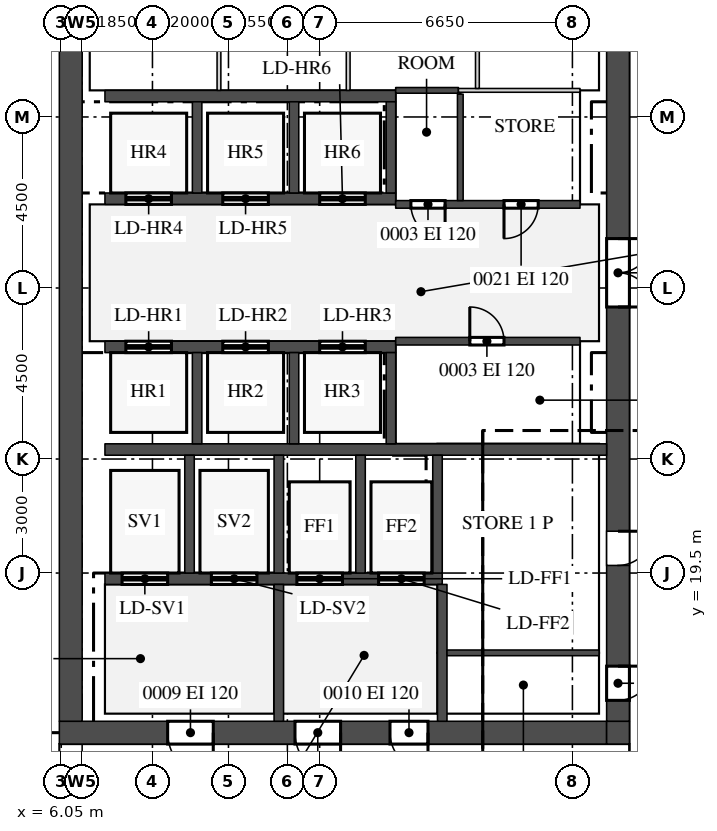
"""IFC4 building model, lengths in metres.
Left out: names, types, materials, properties, quantities, classifications, styles, units other than length and angle.
Written with IfcOpenShell. Run it as: python <this file> out.ifc"""

import sys

from ifc_helpers import new_model, si_unit, direction, frame, frame_2d, origin, place, context, subcontext, project, spatial, rectangle, extrude, source, transform, mapped, element, fill, save


model = new_model("IFC4")
c1 = context("Model", 3, precision=1e-05, world=origin(), true_north=direction((0.0, 1.0)))
c2 = subcontext(c1, "Body", "Model", "MODEL_VIEW")
j1 = project(units=[si_unit("LENGTHUNIT", "METRE"), si_unit("PLANEANGLEUNIT", "RADIAN")], contexts=[c1])
p1 = place(None, origin())
s1 = spatial("IfcSite", under=j1, at=p1, CompositionType="ELEMENT")
p2 = place(p1, origin())
s2 = spatial("IfcBuilding", under=s1, at=p2, CompositionType="ELEMENT")
p3 = place(p2, frame((0.0, 0.0, 318.2)))
s3 = spatial("IfcBuildingStorey", under=s2, at=p3, CompositionType="ELEMENT", Elevation=318.2)
m1 = source(origin(), c2, "Body", "SweptSolid", [
    extrude(rectangle(XDim=14.4, YDim=0.6, at=frame_2d((7.2, 0.0))), origin(), (0.0, 0.0, 1.0), 3.75),
])
p4 = place(p3, frame((6.0, 15.3, 0.0), z_axis=(0.0, 0.0, 1.0), x_axis=(1.0, 0.0, 0.0)))
e1 = element("IfcWall", 1, at=p4, inside=s3, PredefinedType="SHEAR", context=c2, shape_type="MappedRepresentation", body=[
    mapped(m1, transform((0.0, 0.0, 0.0))),
])
m2 = source(origin(), c2, "Body", "SweptSolid", [
    extrude(rectangle(XDim=1.2, YDim=2.1, at=frame_2d((0.6, 1.05))), frame((0.0, 0.31, 0.0), z_axis=(0.0, -1.0, 0.0), x_axis=(1.0, 0.0, 0.0)), (0.0, 0.0, 1.0), 0.62),
])
p5 = place(p4, frame((6.2, 0.0, 0.0)))
e2 = element("IfcOpeningElement", 2, at=p5, cuts=e1, PredefinedType="OPENING", context=c2, shape_type="MappedRepresentation", body=[
    mapped(m2, transform((0.0, 0.0, 0.0))),
])
p6 = place(p4, frame((2.85, 0.0, 0.0)))
e3 = element("IfcOpeningElement", 3, at=p6, cuts=e1, PredefinedType="OPENING", context=c2, shape_type="MappedRepresentation", body=[
    mapped(m2, transform((0.0, 0.0, 0.0))),
])
m3 = source(origin(), c2, "Body", "SweptSolid", [
    extrude(rectangle(XDim=1.0, YDim=2.1, at=frame_2d((0.5, 1.05))), frame((0.0, 0.31, 0.0), z_axis=(0.0, -1.0, 0.0), x_axis=(1.0, 0.0, 0.0)), (0.0, 0.0, 1.0), 0.62),
])
p7 = place(p4, frame((8.7, 0.0, 0.0)))
e4 = element("IfcOpeningElement", 4, at=p7, cuts=e1, PredefinedType="OPENING", context=c2, shape_type="MappedRepresentation", body=[
    mapped(m3, transform((0.0, 0.0, 0.0))),
])
m4 = source(origin(), c2, "Body", "SweptSolid", [
    extrude(rectangle(XDim=0.6, YDim=0.6, at=frame_2d((0.3, 0.0))), origin(), (0.0, 0.0, 1.0), 3.75),
])
p8 = place(p3, frame((20.4, 15.3, 0.0), z_axis=(0.0, 0.0, 1.0), x_axis=(1.0, 0.0, 0.0)))
e5 = element("IfcWall", 5, at=p8, inside=s3, PredefinedType="SHEAR", context=c2, shape_type="MappedRepresentation", body=[
    mapped(m4, transform((0.0, 0.0, 0.0))),
])
m5 = source(origin(), c2, "Body", "SweptSolid", [
    extrude(rectangle(XDim=22.8, YDim=0.6, at=frame_2d((11.4, 0.0))), origin(), (0.0, 0.0, 1.0), 3.75),
])
p9 = place(p3, frame((20.7, 15.6, 0.0), z_axis=(0.0, 0.0, 1.0), x_axis=(0.0, 1.0, 0.0)))
e6 = element("IfcWall", 6, at=p9, inside=s3, PredefinedType="SHEAR", context=c2, shape_type="MappedRepresentation", body=[
    mapped(m5, transform((0.0, 0.0, 0.0))),
])
m6 = source(origin(), c2, "Body", "SweptSolid", [
    extrude(rectangle(XDim=1.8, YDim=2.1, at=frame_2d((0.9, 1.05))), frame((0.0, 0.31, 0.0), z_axis=(0.0, -1.0, 0.0), x_axis=(1.0, 0.0, 0.0)), (0.0, 0.0, 1.0), 0.62),
])
p10 = place(p9, frame((10.9, 0.0, 0.0)))
e7 = element("IfcOpeningElement", 7, at=p10, cuts=e6, PredefinedType="OPENING", context=c2, shape_type="MappedRepresentation", body=[
    mapped(m6, transform((0.0, 0.0, 0.0))),
])
m7 = source(origin(), c2, "Body", "SweptSolid", [
    extrude(rectangle(XDim=0.9, YDim=2.1, at=frame_2d((0.45, 1.05))), frame((0.0, 0.31, 0.0), z_axis=(0.0, -1.0, 0.0), x_axis=(1.0, 0.0, 0.0)), (0.0, 0.0, 1.0), 0.62),
])
p11 = place(p9, frame((0.55, 0.0, 0.0)))
e8 = element("IfcOpeningElement", 8, at=p11, cuts=e6, PredefinedType="OPENING", context=c2, shape_type="MappedRepresentation", body=[
    mapped(m7, transform((0.0, 0.0, 0.0))),
])
p12 = place(p9, frame((4.1, 0.0, 0.0)))
e9 = element("IfcOpeningElement", 9, at=p12, cuts=e6, PredefinedType="OPENING", context=c2, shape_type="MappedRepresentation", body=[
    mapped(m7, transform((0.0, 0.0, 0.0))),
])
p13 = place(p3, frame((6.3, 15.6, 0.0), z_axis=(0.0, 0.0, 1.0), x_axis=(0.0, 1.0, 0.0)))
e10 = element("IfcWall", 10, at=p13, inside=s3, PredefinedType="SHEAR", context=c2, shape_type="MappedRepresentation", body=[
    mapped(m5, transform((0.0, 0.0, 0.0))),
])
m8 = source(origin(), c2, "Body", "SweptSolid", [
    extrude(rectangle(XDim=13.2, YDim=0.3, at=frame_2d((6.6, 0.0))), origin(), (0.0, 0.0, 1.0), 3.75),
])
p14 = place(p3, frame((7.2, 22.75, 0.0), z_axis=(0.0, 0.0, 1.0), x_axis=(1.0, 0.0, 0.0)))
e11 = element("IfcWall", 11, at=p14, inside=s3, PredefinedType="STANDARD", context=c2, shape_type="MappedRepresentation", body=[
    mapped(m8, transform((0.0, 0.0, 0.0))),
])
m9 = source(origin(), c2, "Body", "SweptSolid", [
    extrude(rectangle(XDim=8.875, YDim=0.3, at=frame_2d((4.438, 0.0))), origin(), (0.0, 0.0, 1.0), 3.75),
])
p15 = place(p3, frame((7.2, 19.35, 0.0), z_axis=(0.0, 0.0, 1.0), x_axis=(1.0, 0.0, 0.0)))
e12 = element("IfcWall", 12, at=p15, inside=s3, PredefinedType="STANDARD", context=c2, shape_type="MappedRepresentation", body=[
    mapped(m9, transform((0.0, 0.0, 0.0))),
])
m10 = source(origin(), c2, "Body", "SweptSolid", [
    extrude(rectangle(XDim=1.2, YDim=2.1, at=frame_2d((0.6, 1.05))), frame((0.0, 0.16, 0.0), z_axis=(0.0, -1.0, 0.0), x_axis=(1.0, 0.0, 0.0)), (0.0, 0.0, 1.0), 0.32),
])
p16 = place(p15, frame((0.45, 0.0, 0.0)))
e13 = element("IfcOpeningElement", 13, at=p16, cuts=e12, PredefinedType="OPENING", context=c2, shape_type="MappedRepresentation", body=[
    mapped(m10, transform((0.0, 0.0, 0.0))),
])
p17 = place(p15, frame((2.8, 0.0, 0.0)))
e14 = element("IfcOpeningElement", 14, at=p17, cuts=e12, PredefinedType="OPENING", context=c2, shape_type="MappedRepresentation", body=[
    mapped(m10, transform((0.0, 0.0, 0.0))),
])
p18 = place(p15, frame((5.05, 0.0, 0.0)))
e15 = element("IfcOpeningElement", 15, at=p18, cuts=e12, PredefinedType="OPENING", context=c2, shape_type="MappedRepresentation", body=[
    mapped(m10, transform((0.0, 0.0, 0.0))),
])
p19 = place(p15, frame((7.2, 0.0, 0.0)))
e16 = element("IfcOpeningElement", 16, at=p19, cuts=e12, PredefinedType="OPENING", context=c2, shape_type="MappedRepresentation", body=[
    mapped(m10, transform((0.0, 0.0, 0.0))),
])
m11 = source(origin(), c2, "Body", "SweptSolid", [
    extrude(rectangle(XDim=7.65, YDim=0.3, at=frame_2d((3.825, 0.0))), origin(), (0.0, 0.0, 1.0), 3.75),
])
p20 = place(p3, frame((7.2, 32.05, 0.0), z_axis=(0.0, 0.0, 1.0), x_axis=(1.0, 0.0, 0.0)))
e17 = element("IfcWall", 17, at=p20, inside=s3, PredefinedType="STANDARD", context=c2, shape_type="MappedRepresentation", body=[
    mapped(m11, transform((0.0, 0.0, 0.0))),
])
p21 = place(p3, frame((7.2, 29.35, 0.0), z_axis=(0.0, 0.0, 1.0), x_axis=(1.0, 0.0, 0.0)))
e18 = element("IfcWall", 18, at=p21, inside=s3, PredefinedType="STANDARD", context=c2, shape_type="MappedRepresentation", body=[
    mapped(m11, transform((0.0, 0.0, 0.0))),
])
p22 = place(p21, frame((0.55, 0.0, 0.0)))
e19 = element("IfcOpeningElement", 19, at=p22, cuts=e18, PredefinedType="OPENING", context=c2, shape_type="MappedRepresentation", body=[
    mapped(m10, transform((0.0, 0.0, 0.0))),
])
p23 = place(p21, frame((3.1, 0.0, 0.0)))
e20 = element("IfcOpeningElement", 20, at=p23, cuts=e18, PredefinedType="OPENING", context=c2, shape_type="MappedRepresentation", body=[
    mapped(m10, transform((0.0, 0.0, 0.0))),
])
p24 = place(p21, frame((5.65, 0.0, 0.0)))
e21 = element("IfcOpeningElement", 21, at=p24, cuts=e18, PredefinedType="OPENING", context=c2, shape_type="MappedRepresentation", body=[
    mapped(m10, transform((0.0, 0.0, 0.0))),
])
p25 = place(p3, frame((7.2, 25.45, 0.0), z_axis=(0.0, 0.0, 1.0), x_axis=(1.0, 0.0, 0.0)))
e22 = element("IfcWall", 22, at=p25, inside=s3, PredefinedType="STANDARD", context=c2, shape_type="MappedRepresentation", body=[
    mapped(m11, transform((0.0, 0.0, 0.0))),
])
p26 = place(p25, frame((0.55, 0.0, 0.0)))
e23 = element("IfcOpeningElement", 23, at=p26, cuts=e22, PredefinedType="OPENING", context=c2, shape_type="MappedRepresentation", body=[
    mapped(m10, transform((0.0, 0.0, 0.0))),
])
p27 = place(p25, frame((3.1, 0.0, 0.0)))
e24 = element("IfcOpeningElement", 24, at=p27, cuts=e22, PredefinedType="OPENING", context=c2, shape_type="MappedRepresentation", body=[
    mapped(m10, transform((0.0, 0.0, 0.0))),
])
p28 = place(p25, frame((5.65, 0.0, 0.0)))
e25 = element("IfcOpeningElement", 25, at=p28, cuts=e22, PredefinedType="OPENING", context=c2, shape_type="MappedRepresentation", body=[
    mapped(m10, transform((0.0, 0.0, 0.0))),
])
m12 = source(origin(), c2, "Body", "SweptSolid", [
    extrude(rectangle(XDim=3.1, YDim=0.25, at=frame_2d((1.55, 0.0))), origin(), (0.0, 0.0, 1.0), 3.75),
])
for number, where, z_axis, x_axis in (
    (26, (9.425, 19.5, 0.0), (0.0, 0.0, 1.0), (0.0, 1.0, 0.0)),
    (27, (11.775, 19.5, 0.0), (0.0, 0.0, 1.0), (0.0, 1.0, 0.0)),
    (28, (13.925, 19.5, 0.0), (0.0, 0.0, 1.0), (0.0, 1.0, 0.0)),
    (29, (15.95, 19.5, 0.0), (0.0, 0.0, 1.0), (0.0, 1.0, 0.0)),
):
    element("IfcWall", number, at=place(p3, frame(where, z_axis=z_axis, x_axis=x_axis)), inside=s3, PredefinedType="STANDARD", context=c2, shape_type="MappedRepresentation", body=[
        mapped(m12, transform((0.0, 0.0, 0.0))),
    ])
m13 = source(origin(), c2, "Body", "SweptSolid", [
    extrude(rectangle(XDim=2.4, YDim=0.25, at=frame_2d((1.2, 0.0))), origin(), (0.0, 0.0, 1.0), 3.75),
])
for number, where, z_axis, x_axis in (
    (30, (9.625, 29.5, 0.0), (0.0, 0.0, 1.0), (0.0, 1.0, 0.0)),
    (31, (12.175, 29.5, 0.0), (0.0, 0.0, 1.0), (0.0, 1.0, 0.0)),
    (32, (14.725, 29.5, 0.0), (0.0, 0.0, 1.0), (0.0, 1.0, 0.0)),
):
    element("IfcWall", number, at=place(p3, frame(where, z_axis=z_axis, x_axis=x_axis)), inside=s3, PredefinedType="STANDARD", context=c2, shape_type="MappedRepresentation", body=[
        mapped(m13, transform((0.0, 0.0, 0.0))),
    ])
m14 = source(origin(), c2, "Body", "SweptSolid", [
    extrude(rectangle(XDim=2.4, YDim=0.25, at=frame_2d((1.2, 0.0))), origin(), (0.0, 0.0, 1.0), 3.75),
])
for number, where, z_axis, x_axis in (
    (33, (9.625, 22.9, 0.0), (0.0, 0.0, 1.0), (0.0, 1.0, 0.0)),
    (34, (12.175, 22.9, 0.0), (0.0, 0.0, 1.0), (0.0, 1.0, 0.0)),
    (35, (14.725, 22.9, 0.0), (0.0, 0.0, 1.0), (0.0, 1.0, 0.0)),
):
    element("IfcWall", number, at=place(p3, frame(where, z_axis=z_axis, x_axis=x_axis)), inside=s3, PredefinedType="STANDARD", context=c2, shape_type="MappedRepresentation", body=[
        mapped(m14, transform((0.0, 0.0, 0.0))),
    ])
m15 = source(origin(), c2, "Body", "SweptSolid", [
    extrude(rectangle(XDim=3.6, YDim=0.25, at=frame_2d((1.8, 0.0))), origin(), (0.0, 0.0, 1.0), 3.75),
])
for number, where, z_axis, x_axis in (
    (36, (16.075, 15.6, 0.0), (0.0, 0.0, 1.0), (0.0, 1.0, 0.0)),
    (37, (11.775, 15.6, 0.0), (0.0, 0.0, 1.0), (0.0, 1.0, 0.0)),
):
    element("IfcWall", number, at=place(p3, frame(where, z_axis=z_axis, x_axis=x_axis)), inside=s3, PredefinedType="STANDARD", context=c2, shape_type="MappedRepresentation", body=[
        mapped(m15, transform((0.0, 0.0, 0.0))),
    ])
m16 = source(origin(), c2, "Body", "SweptSolid", [
    extrude(rectangle(XDim=4.0, YDim=0.15, at=frame_2d((2.0, 0.0))), origin(), (0.0, 0.0, 1.0), 3.8),
])
p29 = place(p3, frame((16.2, 17.4, 0.0), z_axis=(0.0, 0.0, 1.0), x_axis=(1.0, 0.0, 0.0)))
e38 = element("IfcWall", 38, at=p29, inside=s3, PredefinedType="PARTITIONING", context=c2, shape_type="MappedRepresentation", body=[
    mapped(m16, transform((0.0, 0.0, 0.0))),
])
m17 = source(origin(), c2, "Body", "SweptSolid", [
    extrude(rectangle(XDim=4.85, YDim=0.2, at=frame_2d((2.425, 0.0))), origin(), (0.0, 0.0, 1.0), 3.8),
])
p30 = place(p3, frame((14.85, 25.6, 0.0), z_axis=(0.0, 0.0, 1.0), x_axis=(1.0, 0.0, 0.0)))
e39 = element("IfcWall", 39, at=p30, inside=s3, PredefinedType="PARTITIONING", context=c2, shape_type="MappedRepresentation", body=[
    mapped(m17, transform((0.0, 0.0, 0.0))),
])
m18 = source(origin(), c2, "Body", "SweptSolid", [
    extrude(rectangle(XDim=0.9, YDim=2.1, at=frame_2d((0.45, 1.05))), frame((0.0, 0.11, 0.0), z_axis=(0.0, -1.0, 0.0), x_axis=(1.0, 0.0, 0.0)), (0.0, 0.0, 1.0), 0.22),
])
p31 = place(p30, frame((1.95, 0.0, 0.0)))
e40 = element("IfcOpeningElement", 40, at=p31, cuts=e39, PredefinedType="OPENING", context=c2, shape_type="MappedRepresentation", body=[
    mapped(m18, transform((0.0, 0.0, 0.0))),
])
p32 = place(p3, frame((14.85, 29.2, 0.0), z_axis=(0.0, 0.0, 1.0), x_axis=(1.0, 0.0, 0.0)))
e41 = element("IfcWall", 41, at=p32, inside=s3, PredefinedType="PARTITIONING", context=c2, shape_type="MappedRepresentation", body=[
    mapped(m17, transform((0.0, 0.0, 0.0))),
])
p33 = place(p32, frame((0.4, 0.0, 0.0)))
e42 = element("IfcOpeningElement", 42, at=p33, cuts=e41, PredefinedType="OPENING", context=c2, shape_type="MappedRepresentation", body=[
    mapped(m18, transform((0.0, 0.0, 0.0))),
])
p34 = place(p32, frame((2.85, 0.0, 0.0)))
e43 = element("IfcOpeningElement", 43, at=p34, cuts=e41, PredefinedType="OPENING", context=c2, shape_type="MappedRepresentation", body=[
    mapped(m18, transform((0.0, 0.0, 0.0))),
])
m19 = source(origin(), c2, "Body", "SweptSolid", [
    extrude(rectangle(XDim=2.8, YDim=0.15, at=frame_2d((1.4, 0.0))), origin(), (0.0, 0.0, 1.0), 3.8),
])
p35 = place(p3, frame((16.55, 29.3, 0.0), z_axis=(0.0, 0.0, 1.0), x_axis=(0.0, 1.0, 0.0)))
e44 = element("IfcWall", 44, at=p35, inside=s3, PredefinedType="PARTITIONING", context=c2, shape_type="MappedRepresentation", body=[
    mapped(m19, transform((0.0, 0.0, 0.0))),
])
m20 = source(origin(), c2, "Body", "SweptSolid", [
    extrude(rectangle(XDim=6.0, YDim=0.1, at=frame_2d((3.0, 0.0))), origin(), (0.0, 0.0, 1.0), 3.8),
])
for number, where, z_axis, x_axis in (
    (45, (10.2, 32.2, 0.0), (0.0, 0.0, 1.0), (0.0, 1.0, 0.0)),
    (46, (13.6, 32.2, 0.0), (0.0, 0.0, 1.0), (0.0, 1.0, 0.0)),
):
    element("IfcWall", number, at=place(p3, frame(where, z_axis=z_axis, x_axis=x_axis)), inside=s3, PredefinedType="PARTITIONING", context=c2, shape_type="MappedRepresentation", body=[
        mapped(m20, transform((0.0, 0.0, 0.0))),
    ])
m21 = source(origin(), c2, "Body", "SweptSolid", [
    extrude(rectangle(XDim=1.65, YDim=0.15, at=frame_2d((0.825, 0.0))), origin(), (0.0, 0.0, 1.0), 3.8),
])
p36 = place(p3, frame((14.85, 32.2, 0.0), z_axis=(0.0, 0.0, 1.0), x_axis=(1.0, 0.0, 0.0)))
e47 = element("IfcWall", 47, at=p36, inside=s3, PredefinedType="PARTITIONING", context=c2, shape_type="MappedRepresentation", body=[
    mapped(m21, transform((0.0, 0.0, 0.0))),
])
m22 = source(origin(), c2, "Body", "SweptSolid", [
    extrude(rectangle(XDim=3.2, YDim=0.1, at=frame_2d((1.6, 0.0))), origin(), (0.0, 0.0, 1.0), 3.8),
])
p37 = place(p3, frame((16.5, 32.2, 0.0), z_axis=(0.0, 0.0, 1.0), x_axis=(1.0, 0.0, 0.0)))
e48 = element("IfcWall", 48, at=p37, inside=s3, PredefinedType="PARTITIONING", context=c2, shape_type="MappedRepresentation", body=[
    mapped(m22, transform((0.0, 0.0, 0.0))),
])
m23 = source(origin(), c2, "Body", "SweptSolid", [
    extrude(rectangle(XDim=5.95, YDim=0.1, at=frame_2d((2.975, 0.0))), origin(), (0.0, 0.0, 1.0), 3.8),
])
p38 = place(p3, frame((17.0, 32.25, 0.0), z_axis=(0.0, 0.0, 1.0), x_axis=(0.0, 1.0, 0.0)))
e49 = element("IfcWall", 49, at=p38, inside=s3, PredefinedType="PARTITIONING", context=c2, shape_type="MappedRepresentation", body=[
    mapped(m23, transform((0.0, 0.0, 0.0))),
])
m24 = source(origin(), c2, "Body", "SweptSolid", [
    extrude(rectangle(XDim=0.9, YDim=2.1, at=frame_2d((0.45, 1.05))), frame((0.0, 0.025, 0.0), z_axis=(0.0, -1.0, 0.0), x_axis=(1.0, 0.0, 0.0)), (0.0, 0.0, 1.0), 0.05),
])
p39 = place(p31, origin())
e50 = element("IfcDoor", 50, at=p39, inside=s3, OperationType="SINGLE_SWING_RIGHT", PredefinedType="DOOR", context=c2, shape_type="MappedRepresentation", body=[
    mapped(m24, transform((0.0, 0.0, 0.0))),
])
fill(e40, e50)
p40 = place(p33, origin())
e51 = element("IfcDoor", 51, at=p40, inside=s3, OperationType="SINGLE_SWING_RIGHT", PredefinedType="DOOR", context=c2, shape_type="MappedRepresentation", body=[
    mapped(m24, transform((0.0, 0.0, 0.0))),
])
fill(e42, e51)
p41 = place(p34, origin())
e52 = element("IfcDoor", 52, at=p41, inside=s3, OperationType="SINGLE_SWING_LEFT", PredefinedType="DOOR", context=c2, shape_type="MappedRepresentation", body=[
    mapped(m24, transform((0.0, 0.0, 0.0))),
])
fill(e43, e52)
m25 = source(origin(), c2, "Body", "SweptSolid", [
    extrude(rectangle(XDim=1.8, YDim=2.1, at=frame_2d((0.9, 1.05))), frame((0.0, 0.25, 0.0), z_axis=(0.0, -1.0, 0.0), x_axis=(1.0, 0.0, 0.0)), (0.0, 0.0, 1.0), 0.5),
])
p42 = place(p10, origin())
e53 = element("IfcDoor", 53, at=p42, inside=s3, OperationType="DOUBLE_DOOR_SINGLE_SWING", PredefinedType="DOOR", context=c2, shape_type="MappedRepresentation", body=[
    mapped(m25, transform((0.0, 0.0, 0.0))),
])
fill(e7, e53)
m26 = source(origin(), c2, "Body", "SweptSolid", [
    extrude(rectangle(XDim=0.9, YDim=2.1, at=frame_2d((0.45, 1.05))), frame((0.0, 0.25, 0.0), z_axis=(0.0, -1.0, 0.0), x_axis=(1.0, 0.0, 0.0)), (0.0, 0.0, 1.0), 0.5),
])
p43 = place(p11, origin())
e54 = element("IfcDoor", 54, at=p43, inside=s3, OperationType="SINGLE_SWING_RIGHT", PredefinedType="DOOR", context=c2, shape_type="MappedRepresentation", body=[
    mapped(m26, transform((0.0, 0.0, 0.0))),
])
fill(e8, e54)
p44 = place(p12, origin())
e55 = element("IfcDoor", 55, at=p44, inside=s3, OperationType="SINGLE_SWING_RIGHT", PredefinedType="DOOR", context=c2, shape_type="MappedRepresentation", body=[
    mapped(m26, transform((0.0, 0.0, 0.0))),
])
fill(e9, e55)
m27 = source(origin(), c2, "Body", "SweptSolid", [
    extrude(rectangle(XDim=1.2, YDim=2.1, at=frame_2d((0.6, 1.05))), frame((0.0, 0.25, 0.0), z_axis=(0.0, -1.0, 0.0), x_axis=(1.0, 0.0, 0.0)), (0.0, 0.0, 1.0), 0.5),
])
p45 = place(p5, origin())
e56 = element("IfcDoor", 56, at=p45, inside=s3, OperationType="SINGLE_SWING_RIGHT", PredefinedType="DOOR", context=c2, shape_type="MappedRepresentation", body=[
    mapped(m27, transform((0.0, 0.0, 0.0))),
])
fill(e2, e56)
p46 = place(p6, origin())
e57 = element("IfcDoor", 57, at=p46, inside=s3, OperationType="SINGLE_SWING_RIGHT", PredefinedType="DOOR", context=c2, shape_type="MappedRepresentation", body=[
    mapped(m27, transform((0.0, 0.0, 0.0))),
])
fill(e3, e57)
m28 = source(origin(), c2, "Body", "SweptSolid", [
    extrude(rectangle(XDim=1.0, YDim=2.1, at=frame_2d((0.5, 1.05))), frame((0.0, 0.25, 0.0), z_axis=(0.0, -1.0, 0.0), x_axis=(1.0, 0.0, 0.0)), (0.0, 0.0, 1.0), 0.5),
])
p47 = place(p7, origin())
e58 = element("IfcDoor", 58, at=p47, inside=s3, OperationType="SINGLE_SWING_RIGHT", PredefinedType="DOOR", context=c2, shape_type="MappedRepresentation", body=[
    mapped(m28, transform((0.0, 0.0, 0.0))),
])
fill(e4, e58)
m29 = source(origin(), c2, "Body", "SweptSolid", [
    extrude(rectangle(XDim=1.2, YDim=2.1, at=frame_2d((0.6, 1.05))), frame((0.0, 0.025, 0.0), z_axis=(0.0, -1.0, 0.0), x_axis=(1.0, 0.0, 0.0)), (0.0, 0.0, 1.0), 0.05),
])
p48 = place(p26, origin())
e59 = element("IfcDoor", 59, at=p48, inside=s3, OperationType="DOUBLE_DOOR_SLIDING", PredefinedType="DOOR", context=c2, shape_type="MappedRepresentation", body=[
    mapped(m29, transform((0.0, 0.0, 0.0))),
])
fill(e23, e59)
p49 = place(p27, origin())
e60 = element("IfcDoor", 60, at=p49, inside=s3, OperationType="DOUBLE_DOOR_SLIDING", PredefinedType="DOOR", context=c2, shape_type="MappedRepresentation", body=[
    mapped(m29, transform((0.0, 0.0, 0.0))),
])
fill(e24, e60)
p50 = place(p28, origin())
e61 = element("IfcDoor", 61, at=p50, inside=s3, OperationType="DOUBLE_DOOR_SLIDING", PredefinedType="DOOR", context=c2, shape_type="MappedRepresentation", body=[
    mapped(m29, transform((0.0, 0.0, 0.0))),
])
fill(e25, e61)
p51 = place(p22, origin())
e62 = element("IfcDoor", 62, at=p51, inside=s3, OperationType="DOUBLE_DOOR_SLIDING", PredefinedType="DOOR", context=c2, shape_type="MappedRepresentation", body=[
    mapped(m29, transform((0.0, 0.0, 0.0))),
])
fill(e19, e62)
p52 = place(p23, origin())
e63 = element("IfcDoor", 63, at=p52, inside=s3, OperationType="DOUBLE_DOOR_SLIDING", PredefinedType="DOOR", context=c2, shape_type="MappedRepresentation", body=[
    mapped(m29, transform((0.0, 0.0, 0.0))),
])
fill(e20, e63)
p53 = place(p24, origin())
e64 = element("IfcDoor", 64, at=p53, inside=s3, OperationType="DOUBLE_DOOR_SLIDING", PredefinedType="DOOR", context=c2, shape_type="MappedRepresentation", body=[
    mapped(m29, transform((0.0, 0.0, 0.0))),
])
fill(e21, e64)
p54 = place(p16, origin())
e65 = element("IfcDoor", 65, at=p54, inside=s3, OperationType="DOUBLE_DOOR_SLIDING", PredefinedType="DOOR", context=c2, shape_type="MappedRepresentation", body=[
    mapped(m29, transform((0.0, 0.0, 0.0))),
])
fill(e13, e65)
p55 = place(p17, origin())
e66 = element("IfcDoor", 66, at=p55, inside=s3, OperationType="DOUBLE_DOOR_SLIDING", PredefinedType="DOOR", context=c2, shape_type="MappedRepresentation", body=[
    mapped(m29, transform((0.0, 0.0, 0.0))),
])
fill(e14, e66)
p56 = place(p18, origin())
e67 = element("IfcDoor", 67, at=p56, inside=s3, OperationType="DOUBLE_DOOR_SLIDING", PredefinedType="DOOR", context=c2, shape_type="MappedRepresentation", body=[
    mapped(m29, transform((0.0, 0.0, 0.0))),
])
fill(e15, e67)
p57 = place(p19, origin())
e68 = element("IfcDoor", 68, at=p57, inside=s3, OperationType="DOUBLE_DOOR_SLIDING", PredefinedType="DOOR", context=c2, shape_type="MappedRepresentation", body=[
    mapped(m29, transform((0.0, 0.0, 0.0))),
])
fill(e16, e68)
save(model, sys.argv[1])
